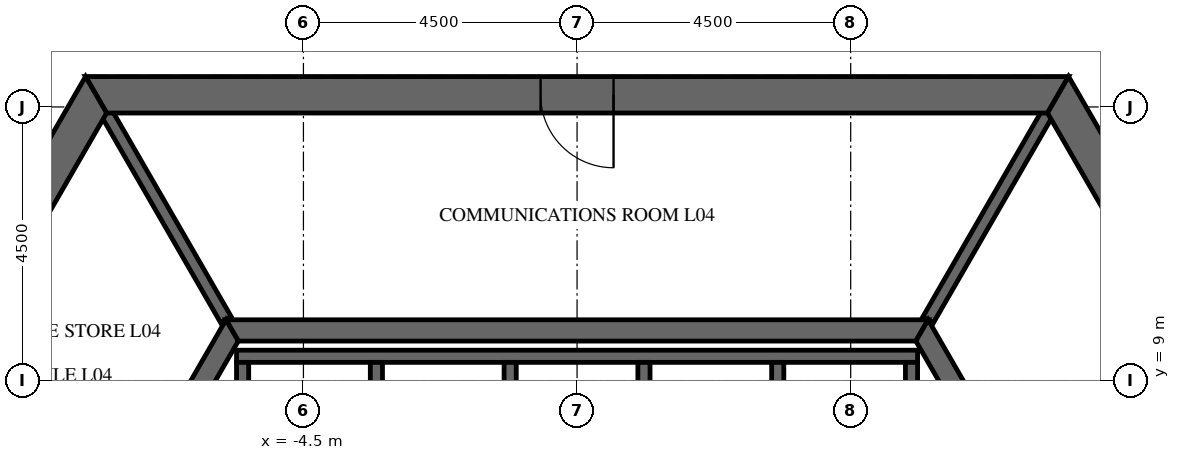
"""IFC4 building model, lengths in metres.
Left out: names, types, materials, properties, quantities, classifications, styles, units other than length and angle.
Written with IfcOpenShell. Run it as: python <this file> out.ifc"""

import sys

from ifc_helpers import new_model, si_unit, direction, frame, frame_2d, origin, place, context, subcontext, project, spatial, polyline, rectangle, outline, extrude, element, fill, save


model = new_model("IFC4")
c1 = context("Model", 3, precision=1e-05, world=origin(), true_north=direction((0.0, 1.0)))
c2 = subcontext(c1, "Body", "Model", "MODEL_VIEW")
j1 = project(units=[si_unit("LENGTHUNIT", "METRE"), si_unit("PLANEANGLEUNIT", "RADIAN")], contexts=[c1])
p1 = place(None, origin())
s1 = spatial("IfcSite", under=j1, at=p1, CompositionType="ELEMENT")
p2 = place(p1, origin())
s2 = spatial("IfcBuilding", under=s1, at=p2, CompositionType="ELEMENT")
p3 = place(p2, frame((0.0, 0.0, 26.0)))
s3 = spatial("IfcBuildingStorey", under=s2, at=p3, CompositionType="ELEMENT", Elevation=26.0)
p4 = place(p3, frame((-7.91, 13.7, -0.25), z_axis=(0.0, 0.0, 1.0), x_axis=(-0.499999880136, -0.866025472988, 0.0)))
e1 = element("IfcWall", 1, at=p4, inside=s3, PredefinedType="SHEAR", context=c2, shape_type="SweptSolid", body=[
    extrude(outline(polyline([(-0.173, -0.3), (15.993, -0.3), (15.646, 0.3), (0.173, 0.3), (-0.173, -0.3)])), origin(), (0.0, 0.0, 1.0), 5.45),
])
p5 = place(p4, frame((7.039, 0.0, 0.25)))
e2 = element("IfcOpeningElement", 2, at=p5, cuts=e1, PredefinedType="OPENING", context=c2, shape_type="SweptSolid", body=[
    extrude(rectangle(XDim=1.8, YDim=2.4, at=frame_2d((0.9, 1.2))), frame((0.0, 0.31, 0.0), z_axis=(0.0, -1.0, 0.0), x_axis=(1.0, 0.0, 0.0)), (0.0, 0.0, 1.0), 0.62),
])
p6 = place(p3, frame((15.819, 0.0, -0.25), z_axis=(0.0, 0.0, 1.0), x_axis=(-0.499999880136, 0.866025472988, 0.0)))
e3 = element("IfcWall", 3, at=p6, inside=s3, PredefinedType="SHEAR", context=c2, shape_type="SweptSolid", body=[
    extrude(outline(polyline([(-0.173, -0.3), (15.993, -0.3), (15.646, 0.3), (0.173, 0.3), (-0.173, -0.3)])), origin(), (0.0, 0.0, 1.0), 5.45),
])
p7 = place(p6, frame((6.981, 0.0, 0.25)))
e4 = element("IfcOpeningElement", 4, at=p7, cuts=e3, PredefinedType="OPENING", context=c2, shape_type="SweptSolid", body=[
    extrude(rectangle(XDim=1.8, YDim=2.4, at=frame_2d((0.9, 1.2))), frame((0.0, 0.31, 0.0), z_axis=(0.0, -1.0, 0.0), x_axis=(1.0, 0.0, 0.0)), (0.0, 0.0, 1.0), 0.62),
])
p8 = place(p3, frame((7.91, 13.7, -0.25), z_axis=(0.0, 0.0, 1.0), x_axis=(-1.0, 0.0, 0.0)))
e5 = element("IfcWall", 5, at=p8, inside=s3, PredefinedType="SHEAR", context=c2, shape_type="SweptSolid", body=[
    extrude(outline(polyline([(-0.173, -0.3), (15.993, -0.3), (15.646, 0.3), (0.173, 0.3), (-0.173, -0.3)])), origin(), (0.0, 0.0, 1.0), 5.45),
])
p9 = place(p8, frame((7.31, 0.0, 0.25)))
e6 = element("IfcOpeningElement", 6, at=p9, cuts=e5, PredefinedType="OPENING", context=c2, shape_type="SweptSolid", body=[
    extrude(rectangle(XDim=1.2, YDim=2.4, at=frame_2d((0.6, 1.2))), frame((0.0, 0.31, 0.0), z_axis=(0.0, -1.0, 0.0), x_axis=(1.0, 0.0, 0.0)), (0.0, 0.0, 1.0), 0.62),
])
p10 = place(p3, frame((-5.673, 9.825, -0.25), z_axis=(0.0, 0.0, 1.0), x_axis=(-0.499995046907, -0.866028263435, 0.0)))
e7 = element("IfcWall", 7, at=p10, inside=s3, PredefinedType="SHEAR", context=c2, shape_type="SweptSolid", body=[
    extrude(outline(polyline([(-0.101, -0.175), (11.446, -0.175), (11.244, 0.175), (0.101, 0.175), (-0.101, -0.175)])), origin(), (0.0, 0.0, 1.0), 5.45),
])
p11 = place(p10, frame((4.801, 0.0, 0.25)))
e8 = element("IfcOpeningElement", 8, at=p11, cuts=e7, PredefinedType="OPENING", context=c2, shape_type="SweptSolid", body=[
    extrude(rectangle(XDim=1.8, YDim=2.4, at=frame_2d((0.9, 1.2))), frame((0.0, 0.185, 0.0), z_axis=(0.0, -1.0, 0.0), x_axis=(1.0, 0.0, 0.0)), (0.0, 0.0, 1.0), 0.37),
])
p12 = place(p3, frame((11.345, 0.0, -0.25), z_axis=(0.0, 0.0, 1.0), x_axis=(-0.499995046907, 0.866028263435, 0.0)))
e9 = element("IfcWall", 9, at=p12, inside=s3, PredefinedType="SHEAR", context=c2, shape_type="SweptSolid", body=[
    extrude(outline(polyline([(-0.101, -0.175), (11.446, -0.175), (11.244, 0.175), (0.101, 0.175), (-0.101, -0.175)])), origin(), (0.0, 0.0, 1.0), 5.45),
])
p13 = place(p12, frame((4.744, 0.0, 0.25)))
e10 = element("IfcOpeningElement", 10, at=p13, cuts=e9, PredefinedType="OPENING", context=c2, shape_type="SweptSolid", body=[
    extrude(rectangle(XDim=1.8, YDim=2.4, at=frame_2d((0.9, 1.2))), frame((0.0, 0.185, 0.0), z_axis=(0.0, -1.0, 0.0), x_axis=(1.0, 0.0, 0.0)), (0.0, 0.0, 1.0), 0.37),
])
p14 = place(p3, frame((5.673, 9.825, -0.25), z_axis=(0.0, 0.0, 1.0), x_axis=(-1.0, 0.0, 0.0)))
e11 = element("IfcWall", 11, at=p14, inside=s3, PredefinedType="SHEAR", context=c2, shape_type="SweptSolid", body=[
    extrude(outline(polyline([(-0.101, -0.175), (11.446, -0.175), (11.244, 0.175), (0.101, 0.175), (-0.101, -0.175)])), origin(), (0.0, 0.0, 1.0), 5.45),
])
p15 = place(p3, frame((-5.6, 9.4, -0.25), z_axis=(0.0, 0.0, 1.0), x_axis=(1.0, 0.0, 0.0)))
e12 = element("IfcWall", 12, at=p15, inside=s3, PredefinedType="SHEAR", context=c2, shape_type="SweptSolid", body=[
    extrude(rectangle(XDim=11.2, YDim=0.2, at=frame_2d((5.6, 0.0))), origin(), (0.0, 0.0, 1.0), 5.5),
])
for number, where, z_axis, x_axis in (
    (13, (-5.5, 6.4, -0.25), (0.0, 0.0, 1.0), (0.0, 1.0, 0.0)),
    (14, (-3.3, 6.4, -0.25), (0.0, 0.0, 1.0), (0.0, 1.0, 0.0)),
    (15, (-1.1, 6.4, -0.25), (0.0, 0.0, 1.0), (0.0, 1.0, 0.0)),
    (16, (1.1, 6.4, -0.25), (0.0, 0.0, 1.0), (0.0, 1.0, 0.0)),
    (17, (3.3, 6.4, -0.25), (0.0, 0.0, 1.0), (0.0, 1.0, 0.0)),
    (18, (5.5, 6.4, -0.25), (0.0, 0.0, 1.0), (0.0, 1.0, 0.0)),
):
    element("IfcWall", number, at=place(p3, frame(where, z_axis=z_axis, x_axis=x_axis)), inside=s3, PredefinedType="SHEAR", context=c2, shape_type="SweptSolid", body=[
        extrude(rectangle(XDim=2.9, YDim=0.2, at=frame_2d((1.45, 0.0))), origin(), (0.0, 0.0, 1.0), 5.5),
    ])
for number, where, z_axis, x_axis in (
    (19, (5.773, 10.0, -0.25), (0.0, 0.0, 1.0), (0.5, 0.866, 0.0)),
    (20, (-5.773, 10.0, -0.25), (0.0, 0.0, 1.0), (-0.5, 0.866, 0.0)),
):
    element("IfcWall", number, at=place(p3, frame(where, z_axis=z_axis, x_axis=x_axis)), inside=s3, PredefinedType="SHEAR", context=c2, shape_type="SweptSolid", body=[
        extrude(rectangle(XDim=3.926, YDim=0.2, at=frame_2d((1.963, 0.0))), origin(), (0.0, 0.0, 1.0), 5.45),
    ])
p16 = place(p9, origin())
e21 = element("IfcDoor", 21, at=p16, inside=s3, OperationType="SINGLE_SWING_LEFT", PredefinedType="DOOR", context=c2, shape_type="SweptSolid", body=[
    extrude(rectangle(XDim=1.2, YDim=2.4, at=frame_2d((0.6, 1.2))), frame((0.0, 0.025, 0.0), z_axis=(0.0, -1.0, 0.0), x_axis=(1.0, 0.0, 0.0)), (0.0, 0.0, 1.0), 0.05),
])
fill(e6, e21)
save(model, sys.argv[1])
